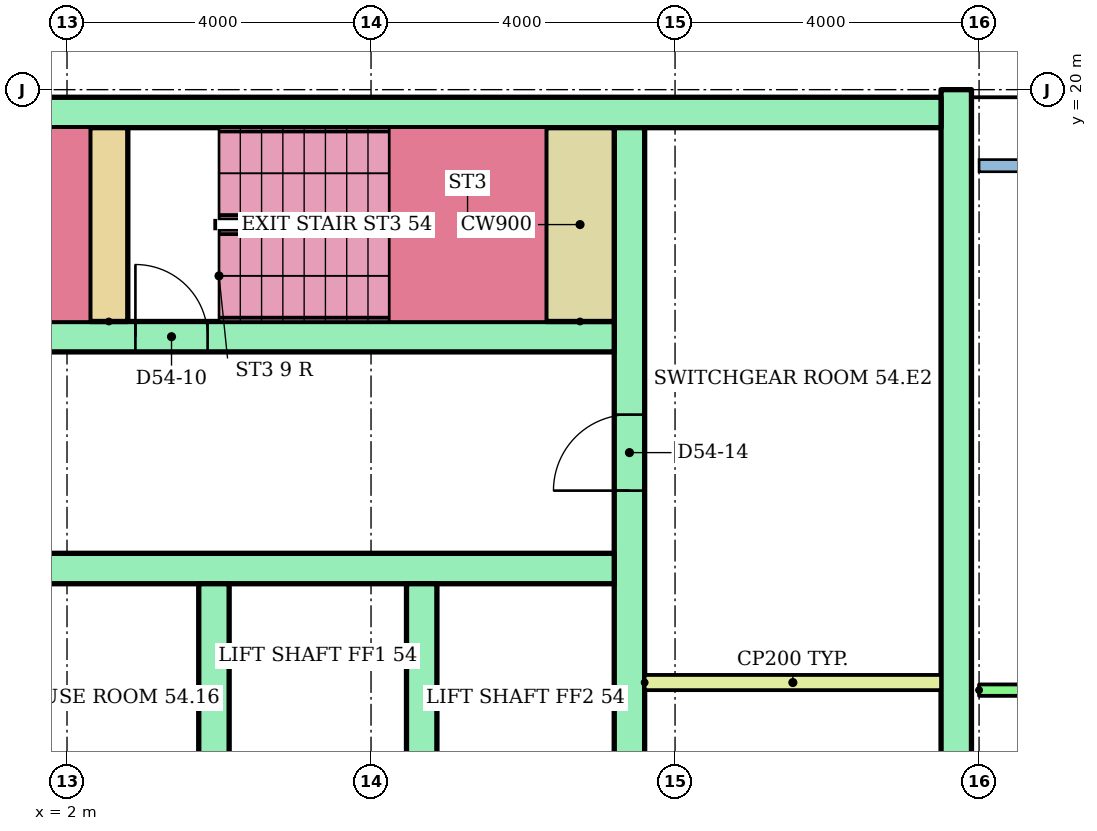
"""IFC4 building model, lengths in metres.
Left out: names, types, materials, properties, quantities, classifications, styles, units other than length and angle.
Written with IfcOpenShell. Run it as: python <this file> out.ifc"""

import sys

from ifc_helpers import new_model, si_unit, direction, frame, frame_2d, origin, place, context, subcontext, project, spatial, rectangle, extrude, element, fill, save


model = new_model("IFC4")
c1 = context("Model", 3, precision=1e-05, world=origin(), true_north=direction((0.0, 1.0)))
c2 = subcontext(c1, "Body", "Model", "MODEL_VIEW")
j1 = project(units=[si_unit("LENGTHUNIT", "METRE"), si_unit("PLANEANGLEUNIT", "RADIAN")], contexts=[c1])
p1 = place(None, origin())
s1 = spatial("IfcSite", under=j1, at=p1, CompositionType="ELEMENT")
p2 = place(p1, origin())
s2 = spatial("IfcBuilding", under=s1, at=p2, CompositionType="ELEMENT")
p3 = place(p2, frame((0.0, 0.0, 210.8)))
s3 = spatial("IfcBuildingStorey", under=s2, at=p3, CompositionType="ELEMENT", Elevation=210.8)
p4 = place(p3, frame((13.7, 3.0, 0.0), z_axis=(0.0, 0.0, 1.0), x_axis=(0.0, 1.0, 0.0)))
e1 = element("IfcWall", 1, at=p4, inside=s3, PredefinedType="SHEAR", context=c2, shape_type="SweptSolid", body=[
    extrude(rectangle(XDim=17.0, YDim=0.4, at=frame_2d((8.5, 0.0))), origin(), (0.0, 0.0, 1.0), 2.92),
])
p5 = place(p3, frame((-13.5, 19.7, 0.0)))
e2 = element("IfcWall", 2, at=p5, inside=s3, PredefinedType="SHEAR", context=c2, shape_type="SweptSolid", body=[
    extrude(rectangle(XDim=27.0, YDim=0.4, at=frame_2d((13.5, 0.0))), origin(), (0.0, 0.0, 1.0), 2.92),
])
p6 = place(p3, frame((9.4, 6.8, 0.0), z_axis=(0.0, 0.0, 1.0), x_axis=(0.0, 1.0, 0.0)))
e3 = element("IfcWall", 3, at=p6, inside=s3, PredefinedType="SHEAR", context=c2, shape_type="SweptSolid", body=[
    extrude(rectangle(XDim=12.7, YDim=0.4, at=frame_2d((6.35, 0.0))), origin(), (0.0, 0.0, 1.0), 2.92),
])
p7 = place(p6, frame((1.15, 0.0, 0.0)))
e4 = element("IfcOpeningElement", 4, at=p7, cuts=e3, PredefinedType="OPENING", context=c2, shape_type="SweptSolid", body=[
    extrude(rectangle(XDim=1.0, YDim=2.1, at=frame_2d((0.5, 1.05))), frame((0.0, 0.21, 0.0), z_axis=(0.0, -1.0, 0.0), x_axis=(1.0, 0.0, 0.0)), (0.0, 0.0, 1.0), 0.42),
])
p8 = place(p6, frame((7.925, 0.0, 0.0)))
e5 = element("IfcOpeningElement", 5, at=p8, cuts=e3, PredefinedType="OPENING", context=c2, shape_type="SweptSolid", body=[
    extrude(rectangle(XDim=1.0, YDim=2.1, at=frame_2d((0.5, 1.05))), frame((0.0, 0.21, 0.0), z_axis=(0.0, -1.0, 0.0), x_axis=(1.0, 0.0, 0.0)), (0.0, 0.0, 1.0), 0.42),
])
p9 = place(p3, frame((1.2, 13.7, 0.0)))
e6 = element("IfcWall", 6, at=p9, inside=s3, PredefinedType="SHEAR", context=c2, shape_type="SweptSolid", body=[
    extrude(rectangle(XDim=8.0, YDim=0.4, at=frame_2d((4.0, 0.0))), origin(), (0.0, 0.0, 1.0), 2.92),
])
for number, where, z_axis, x_axis in (
    (7, (3.933, 10.5, 0.0), (0.0, 0.0, 1.0), (0.0, 1.0, 0.0)),
    (8, (6.667, 10.5, 0.0), (0.0, 0.0, 1.0), (0.0, 1.0, 0.0)),
):
    element("IfcWall", number, at=place(p3, frame(where, z_axis=z_axis, x_axis=x_axis)), inside=s3, PredefinedType="SHEAR", context=c2, shape_type="SweptSolid", body=[
        extrude(rectangle(XDim=3.0, YDim=0.4, at=frame_2d((1.5, 0.0))), origin(), (0.0, 0.0, 1.0), 2.92),
    ])
p10 = place(p3, frame((-9.2, 16.75, 0.0)))
e9 = element("IfcWall", 9, at=p10, inside=s3, PredefinedType="SHEAR", context=c2, shape_type="SweptSolid", body=[
    extrude(rectangle(XDim=18.4, YDim=0.4, at=frame_2d((9.2, 0.0))), origin(), (0.0, 0.0, 1.0), 2.92),
])
p11 = place(p10, frame((0.1, 0.0, 0.0)))
e10 = element("IfcOpeningElement", 10, at=p11, cuts=e9, PredefinedType="OPENING", context=c2, shape_type="SweptSolid", body=[
    extrude(rectangle(XDim=0.95, YDim=2.1, at=frame_2d((0.475, 1.05))), frame((0.0, 0.21, 0.0), z_axis=(0.0, -1.0, 0.0), x_axis=(1.0, 0.0, 0.0)), (0.0, 0.0, 1.0), 0.42),
])
p12 = place(p10, frame((6.1, 0.0, 0.0)))
e11 = element("IfcOpeningElement", 11, at=p12, cuts=e9, PredefinedType="OPENING", context=c2, shape_type="SweptSolid", body=[
    extrude(rectangle(XDim=0.95, YDim=2.1, at=frame_2d((0.475, 1.05))), frame((0.0, 0.21, 0.0), z_axis=(0.0, -1.0, 0.0), x_axis=(1.0, 0.0, 0.0)), (0.0, 0.0, 1.0), 0.42),
])
p13 = place(p10, frame((12.1, 0.0, 0.0)))
e12 = element("IfcOpeningElement", 12, at=p13, cuts=e9, PredefinedType="OPENING", context=c2, shape_type="SweptSolid", body=[
    extrude(rectangle(XDim=0.95, YDim=2.1, at=frame_2d((0.475, 1.05))), frame((0.0, 0.21, 0.0), z_axis=(0.0, -1.0, 0.0), x_axis=(1.0, 0.0, 0.0)), (0.0, 0.0, 1.0), 0.42),
])
p14 = place(p3, frame((2.55, 16.95, 0.0), z_axis=(0.0, 0.0, 1.0), x_axis=(0.0, 1.0, 0.0)))
e13 = element("IfcWall", 13, at=p14, inside=s3, PredefinedType="SHEAR", context=c2, shape_type="SweptSolid", body=[
    extrude(rectangle(XDim=2.55, YDim=0.5, at=frame_2d((1.275, 0.0))), origin(), (0.0, 0.0, 1.0), 2.92),
])
p15 = place(p3, frame((8.75, 16.95, 0.0), z_axis=(0.0, 0.0, 1.0), x_axis=(0.0, 1.0, 0.0)))
e14 = element("IfcWall", 14, at=p15, inside=s3, PredefinedType="SHEAR", context=c2, shape_type="SweptSolid", body=[
    extrude(rectangle(XDim=2.55, YDim=0.9, at=frame_2d((1.275, 0.0))), origin(), (0.0, 0.0, 1.0), 2.92),
])
p16 = place(p3, frame((9.6, 12.2, 0.0)))
e15 = element("IfcWall", 15, at=p16, inside=s3, PredefinedType="PARTITIONING", context=c2, shape_type="SweptSolid", body=[
    extrude(rectangle(XDim=3.9, YDim=0.2, at=frame_2d((1.95, 0.0))), origin(), (0.0, 0.0, 1.0), 2.92),
])
p17 = place(p3, frame((14.0, 12.1, 0.0)))
e16 = element("IfcWall", 16, at=p17, inside=s3, PredefinedType="PARTITIONING", context=c2, shape_type="SweptSolid", body=[
    extrude(rectangle(XDim=14.92, YDim=0.15, at=frame_2d((7.46, 0.0))), origin(), (0.0, 0.0, 1.0), 2.4),
])
p18 = place(p17, frame((4.6, 0.0, 0.0)))
e17 = element("IfcOpeningElement", 17, at=p18, cuts=e16, PredefinedType="OPENING", context=c2, shape_type="SweptSolid", body=[
    extrude(rectangle(XDim=1.0, YDim=2.1, at=frame_2d((0.5, 1.05))), frame((0.0, 0.085, 0.0), z_axis=(0.0, -1.0, 0.0), x_axis=(1.0, 0.0, 0.0)), (0.0, 0.0, 1.0), 0.17),
])
p19 = place(p17, frame((12.476, 0.0, 0.0)))
e18 = element("IfcOpeningElement", 18, at=p19, cuts=e16, PredefinedType="OPENING", context=c2, shape_type="SweptSolid", body=[
    extrude(rectangle(XDim=0.9, YDim=2.1, at=frame_2d((0.45, 1.05))), frame((0.0, 0.085, 0.0), z_axis=(0.0, -1.0, 0.0), x_axis=(1.0, 0.0, 0.0)), (0.0, 0.0, 1.0), 0.17),
])
p20 = place(p13, origin())
e19 = element("IfcDoor", 19, at=p20, inside=s3, OperationType="SINGLE_SWING_LEFT", PredefinedType="DOOR", context=c2, shape_type="SweptSolid", body=[
    extrude(rectangle(XDim=0.95, YDim=2.1, at=frame_2d((0.475, 1.05))), frame((0.0, 0.025, 0.0), z_axis=(0.0, -1.0, 0.0), x_axis=(1.0, 0.0, 0.0)), (0.0, 0.0, 1.0), 0.05),
])
fill(e12, e19)
p21 = place(p8, origin())
e20 = element("IfcDoor", 20, at=p21, inside=s3, OperationType="SINGLE_SWING_LEFT", PredefinedType="DOOR", context=c2, shape_type="SweptSolid", body=[
    extrude(rectangle(XDim=1.0, YDim=2.1, at=frame_2d((0.5, 1.05))), frame((0.0, 0.025, 0.0), z_axis=(0.0, -1.0, 0.0), x_axis=(1.0, 0.0, 0.0)), (0.0, 0.0, 1.0), 0.05),
])
fill(e5, e20)
save(model, sys.argv[1])
